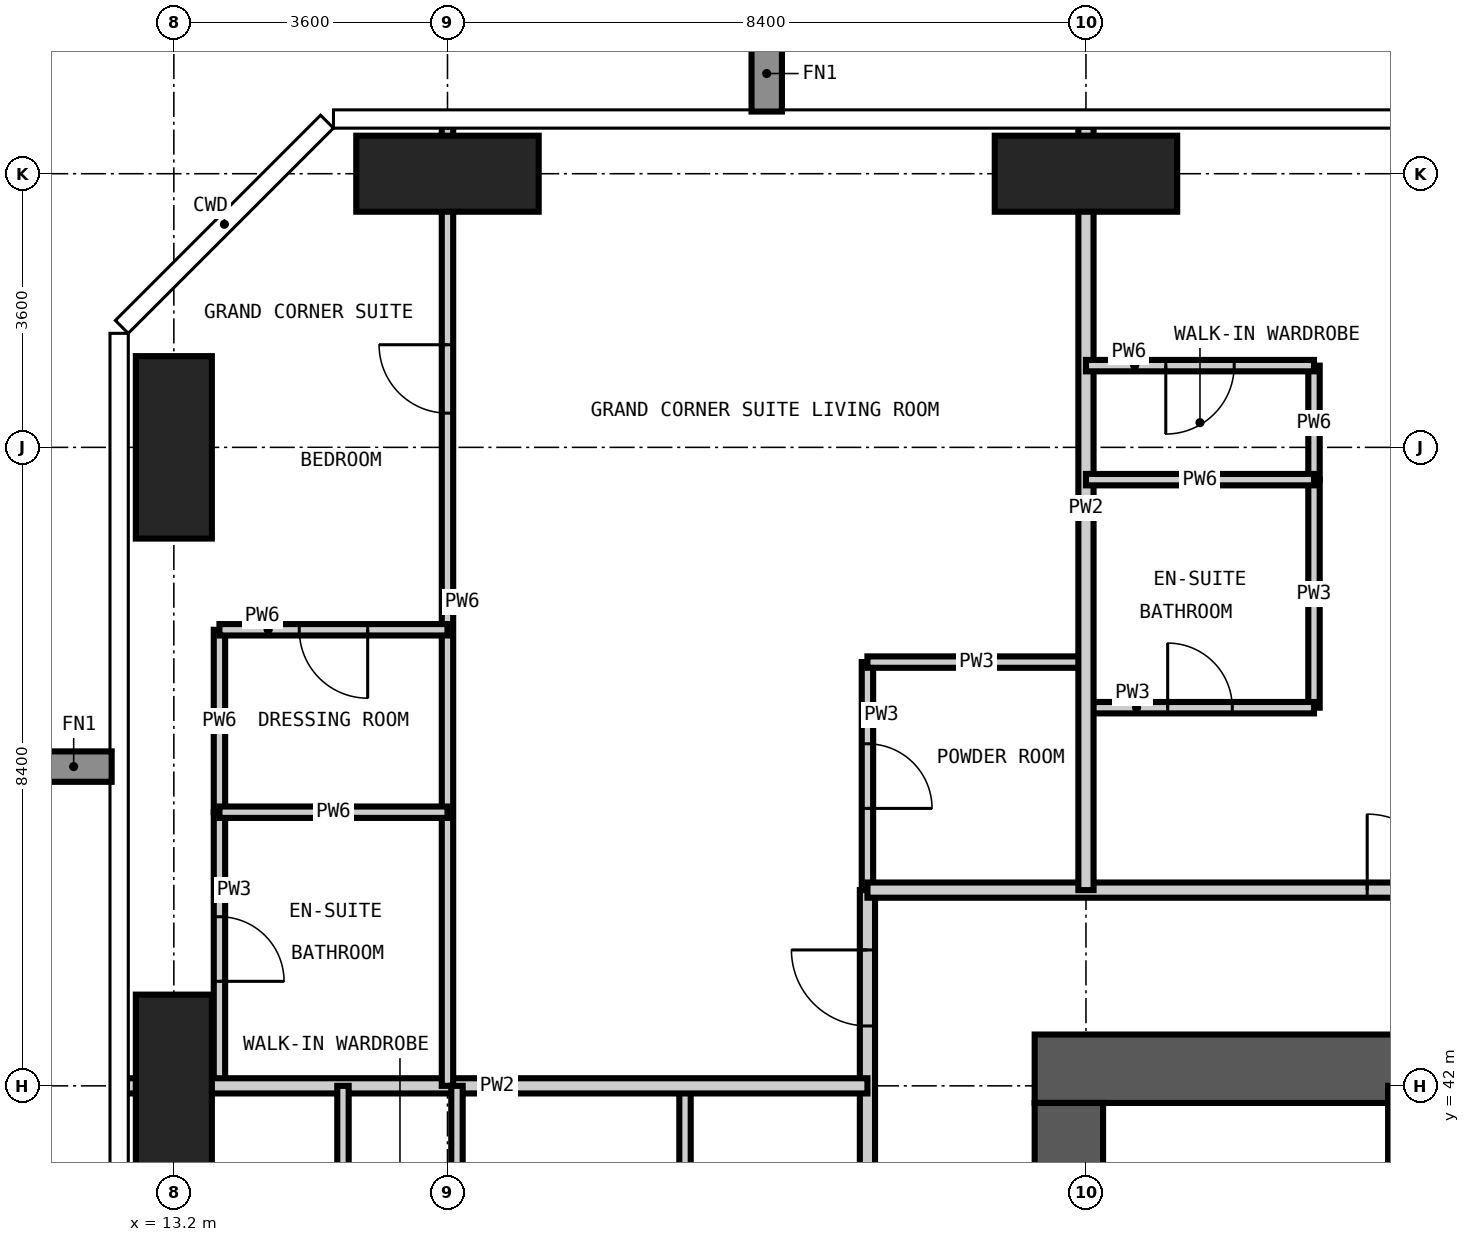
"""IFC4 building model, lengths in metres.
Left out: names, types, materials, properties, quantities, classifications, styles, units other than length and angle.
Written with IfcOpenShell. Run it as: python <this file> out.ifc"""

import sys

from ifc_helpers import new_model, si_unit, direction, frame, frame_2d, origin, origin_2d, place, context, subcontext, project, spatial, rectangle, extrude, element, fill, save


model = new_model("IFC4")
c1 = context("Model", 3, precision=1e-05, world=origin(), true_north=direction((0.0, 1.0)))
c2 = subcontext(c1, "Body", "Model", "MODEL_VIEW")
j1 = project(units=[si_unit("LENGTHUNIT", "METRE"), si_unit("PLANEANGLEUNIT", "RADIAN")], contexts=[c1])
p1 = place(None, origin())
s1 = spatial("IfcSite", under=j1, at=p1, CompositionType="ELEMENT")
p2 = place(p1, origin())
s2 = spatial("IfcBuilding", under=s1, at=p2, CompositionType="ELEMENT")
p3 = place(p2, frame((0.0, 0.0, 237.3)))
s3 = spatial("IfcBuildingStorey", under=s2, at=p3, CompositionType="ELEMENT", Elevation=237.3)
for number, where, z_axis, x_axis in (
    (1, (13.2, 42.0, -0.35), (0.0, 0.0, 1.0), (1.0, 0.0, 0.0)),
    (2, (13.2, 50.4, -0.35), (0.0, 0.0, 1.0), (1.0, 0.0, 0.0)),
):
    element("IfcColumn", number, at=place(p3, frame(where, z_axis=z_axis, x_axis=x_axis)), inside=s3, PredefinedType="COLUMN", context=c2, shape_type="SweptSolid", body=[
        extrude(rectangle(XDim=1.0, YDim=2.4, at=origin_2d()), origin(), (0.0, 0.0, 1.0), 3.9),
    ])
for number, where, z_axis, x_axis in (
    (3, (16.8, 54.0, -0.35), (0.0, 0.0, 1.0), (1.0, 0.0, 0.0)),
    (4, (25.2, 54.0, -0.35), (0.0, 0.0, 1.0), (1.0, 0.0, 0.0)),
):
    element("IfcColumn", number, at=place(p3, frame(where, z_axis=z_axis, x_axis=x_axis)), inside=s3, PredefinedType="COLUMN", context=c2, shape_type="SweptSolid", body=[
        extrude(rectangle(XDim=2.4, YDim=1.0, at=origin_2d()), origin(), (0.0, 0.0, 1.0), 3.9),
    ])
p4 = place(p3, frame((42.675, 42.225, -0.35), z_axis=(0.0, 0.0, 1.0), x_axis=(-1.0, 0.0, 0.0)))
e5 = element("IfcWall", 5, at=p4, inside=s3, PredefinedType="SHEAR", context=c2, shape_type="SweptSolid", body=[
    extrude(rectangle(XDim=18.15, YDim=0.9, at=frame_2d((9.075, 0.0))), origin(), (0.0, 0.0, 1.0), 3.9),
])
p5 = place(p4, frame((10.575, 0.0, 0.35)))
e6 = element("IfcOpeningElement", 6, at=p5, cuts=e5, PredefinedType="OPENING", context=c2, shape_type="SweptSolid", body=[
    extrude(rectangle(XDim=1.2, YDim=2.2, at=frame_2d((0.6, 1.1))), frame((0.0, 0.46, 0.0), z_axis=(0.0, -1.0, 0.0), x_axis=(1.0, 0.0, 0.0)), (0.0, 0.0, 1.0), 0.92),
])
p6 = place(p3, frame((24.975, 41.775, -0.35), z_axis=(0.0, 0.0, 1.0), x_axis=(0.0, -1.0, 0.0)))
e7 = element("IfcWall", 7, at=p6, inside=s3, PredefinedType="SHEAR", context=c2, shape_type="SweptSolid", body=[
    extrude(rectangle(XDim=24.75, YDim=0.9, at=frame_2d((12.375, 0.0))), origin(), (0.0, 0.0, 1.0), 3.9),
])
p7 = place(p6, frame((11.875, 0.0, 0.35)))
e8 = element("IfcOpeningElement", 8, at=p7, cuts=e7, PredefinedType="OPENING", context=c2, shape_type="SweptSolid", body=[
    extrude(rectangle(XDim=1.0, YDim=2.1, at=frame_2d((0.5, 1.05))), frame((0.0, 0.46, 0.0), z_axis=(0.0, -1.0, 0.0), x_axis=(1.0, 0.0, 0.0)), (0.0, 0.0, 1.0), 0.92),
])
p8 = place(p3, frame((29.4, 33.6, -0.35), z_axis=(0.0, 0.0, 1.0), x_axis=(0.0, 1.0, 0.0)))
e9 = element("IfcWall", 9, at=p8, inside=s3, PredefinedType="SHEAR", context=c2, shape_type="SweptSolid", body=[
    extrude(rectangle(XDim=8.4, YDim=0.45, at=frame_2d((4.2, 0.0))), origin(), (0.0, 0.0, 1.0), 3.9),
])
p9 = place(p8, frame((0.525, 0.0, 0.35)))
e10 = element("IfcOpeningElement", 10, at=p9, cuts=e9, PredefinedType="OPENING", context=c2, shape_type="SweptSolid", body=[
    extrude(rectangle(XDim=1.2, YDim=2.2, at=frame_2d((0.6, 1.1))), frame((0.0, 0.235, 0.0), z_axis=(0.0, -1.0, 0.0), x_axis=(1.0, 0.0, 0.0)), (0.0, 0.0, 1.0), 0.47),
])
p10 = place(p3, frame((13.8, 42.0, 0.0), z_axis=(0.0, 0.0, 1.0), x_axis=(0.0, 1.0, 0.0)))
e11 = element("IfcWall", 11, at=p10, inside=s3, PredefinedType="PARTITIONING", context=c2, shape_type="SweptSolid", body=[
    extrude(rectangle(XDim=3.6, YDim=0.15, at=frame_2d((1.8, 0.0))), origin(), (0.0, 0.0, 1.0), 3.55),
])
p11 = place(p10, frame((1.375, 0.0, 0.0)))
e12 = element("IfcOpeningElement", 12, at=p11, cuts=e11, PredefinedType="OPENING", context=c2, shape_type="SweptSolid", body=[
    extrude(rectangle(XDim=0.85, YDim=2.1, at=frame_2d((0.425, 1.05))), frame((0.0, 0.085, 0.0), z_axis=(0.0, -1.0, 0.0), x_axis=(1.0, 0.0, 0.0)), (0.0, 0.0, 1.0), 0.17),
])
p12 = place(p3, frame((19.925, 39.0, 0.0), z_axis=(0.0, 0.0, 1.0), x_axis=(0.0, 1.0, 0.0)))
e13 = element("IfcWall", 13, at=p12, inside=s3, PredefinedType="PARTITIONING", context=c2, shape_type="SweptSolid", body=[
    extrude(rectangle(XDim=3.0, YDim=0.15, at=frame_2d((1.5, 0.0))), origin(), (0.0, 0.0, 1.0), 3.55),
])
p13 = place(p3, frame((22.325, 44.575, 0.0), z_axis=(0.0, 0.0, 1.0), x_axis=(0.0, 1.0, 0.0)))
e14 = element("IfcWall", 14, at=p13, inside=s3, PredefinedType="PARTITIONING", context=c2, shape_type="SweptSolid", body=[
    extrude(rectangle(XDim=3.0, YDim=0.15, at=frame_2d((1.5, 0.0))), origin(), (0.0, 0.0, 1.0), 3.55),
])
p14 = place(p13, frame((1.075, 0.0, 0.0)))
e15 = element("IfcOpeningElement", 15, at=p14, cuts=e14, PredefinedType="OPENING", context=c2, shape_type="SweptSolid", body=[
    extrude(rectangle(XDim=0.85, YDim=2.1, at=frame_2d((0.425, 1.05))), frame((0.0, 0.085, 0.0), z_axis=(0.0, -1.0, 0.0), x_axis=(1.0, 0.0, 0.0)), (0.0, 0.0, 1.0), 0.17),
])
p15 = place(p3, frame((28.2, 46.975, 0.0), z_axis=(0.0, 0.0, 1.0), x_axis=(0.0, 1.0, 0.0)))
e16 = element("IfcWall", 16, at=p15, inside=s3, PredefinedType="PARTITIONING", context=c2, shape_type="SweptSolid", body=[
    extrude(rectangle(XDim=3.0, YDim=0.15, at=frame_2d((1.5, 0.0))), origin(), (0.0, 0.0, 1.0), 3.55),
])
p16 = place(p3, frame((25.2, 46.975, 0.0), z_axis=(0.0, 0.0, 1.0), x_axis=(1.0, 0.0, 0.0)))
e17 = element("IfcWall", 17, at=p16, inside=s3, PredefinedType="PARTITIONING", context=c2, shape_type="SweptSolid", body=[
    extrude(rectangle(XDim=3.0, YDim=0.15, at=frame_2d((1.5, 0.0))), origin(), (0.0, 0.0, 1.0), 3.55),
])
p17 = place(p16, frame((1.075, 0.0, 0.0)))
e18 = element("IfcOpeningElement", 18, at=p17, cuts=e17, PredefinedType="OPENING", context=c2, shape_type="SweptSolid", body=[
    extrude(rectangle(XDim=0.85, YDim=2.1, at=frame_2d((0.425, 1.05))), frame((0.0, 0.085, 0.0), z_axis=(0.0, -1.0, 0.0), x_axis=(1.0, 0.0, 0.0)), (0.0, 0.0, 1.0), 0.17),
])
p18 = place(p3, frame((22.325, 47.575, 0.0), z_axis=(0.0, 0.0, 1.0), x_axis=(1.0, 0.0, 0.0)))
e19 = element("IfcWall", 19, at=p18, inside=s3, PredefinedType="PARTITIONING", context=c2, shape_type="SweptSolid", body=[
    extrude(rectangle(XDim=2.875, YDim=0.15, at=frame_2d((1.438, 0.0))), origin(), (0.0, 0.0, 1.0), 3.55),
])
p19 = place(p3, frame((22.325, 13.925, 0.0), z_axis=(0.0, 0.0, 1.0), x_axis=(0.0, 1.0, 0.0)))
e20 = element("IfcWall", 20, at=p19, inside=s3, PredefinedType="PARTITIONING", context=c2, shape_type="SweptSolid", body=[
    extrude(rectangle(XDim=30.65, YDim=0.2, at=frame_2d((15.325, 0.0))), origin(), (0.0, 0.0, 1.0), 3.55),
])
p20 = place(p19, frame((8.675, 0.0, 0.0)))
e21 = element("IfcOpeningElement", 21, at=p20, cuts=e20, PredefinedType="OPENING", context=c2, shape_type="SweptSolid", body=[
    extrude(rectangle(XDim=1.0, YDim=2.2, at=frame_2d((0.5, 1.1))), frame((0.0, 0.11, 0.0), z_axis=(0.0, -1.0, 0.0), x_axis=(1.0, 0.0, 0.0)), (0.0, 0.0, 1.0), 0.22),
])
p21 = place(p19, frame((21.275, 0.0, 0.0)))
e22 = element("IfcOpeningElement", 22, at=p21, cuts=e20, PredefinedType="OPENING", context=c2, shape_type="SweptSolid", body=[
    extrude(rectangle(XDim=1.0, YDim=2.2, at=frame_2d((0.5, 1.1))), frame((0.0, 0.11, 0.0), z_axis=(0.0, -1.0, 0.0), x_axis=(1.0, 0.0, 0.0)), (0.0, 0.0, 1.0), 0.22),
])
p22 = place(p19, frame((0.938, 0.0, 0.0)))
e23 = element("IfcOpeningElement", 23, at=p22, cuts=e20, PredefinedType="OPENING", context=c2, shape_type="SweptSolid", body=[
    extrude(rectangle(XDim=1.0, YDim=2.2, at=frame_2d((0.5, 1.1))), frame((0.0, 0.11, 0.0), z_axis=(0.0, -1.0, 0.0), x_axis=(1.0, 0.0, 0.0)), (0.0, 0.0, 1.0), 0.22),
])
p23 = place(p19, frame((28.863, 0.0, 0.0)))
e24 = element("IfcOpeningElement", 24, at=p23, cuts=e20, PredefinedType="OPENING", context=c2, shape_type="SweptSolid", body=[
    extrude(rectangle(XDim=1.0, YDim=2.2, at=frame_2d((0.5, 1.1))), frame((0.0, 0.11, 0.0), z_axis=(0.0, -1.0, 0.0), x_axis=(1.0, 0.0, 0.0)), (0.0, 0.0, 1.0), 0.22),
])
p24 = place(p3, frame((22.325, 44.575, 0.0), z_axis=(0.0, 0.0, 1.0), x_axis=(1.0, 0.0, 0.0)))
e25 = element("IfcWall", 25, at=p24, inside=s3, PredefinedType="PARTITIONING", context=c2, shape_type="SweptSolid", body=[
    extrude(rectangle(XDim=22.85, YDim=0.2, at=frame_2d((11.425, 0.0))), origin(), (0.0, 0.0, 1.0), 3.55),
])
p25 = place(p24, frame((6.575, 0.0, 0.0)))
e26 = element("IfcOpeningElement", 26, at=p25, cuts=e25, PredefinedType="OPENING", context=c2, shape_type="SweptSolid", body=[
    extrude(rectangle(XDim=1.0, YDim=2.2, at=frame_2d((0.5, 1.1))), frame((0.0, 0.11, 0.0), z_axis=(0.0, -1.0, 0.0), x_axis=(1.0, 0.0, 0.0)), (0.0, 0.0, 1.0), 0.22),
])
p26 = place(p24, frame((14.975, 0.0, 0.0)))
e27 = element("IfcOpeningElement", 27, at=p26, cuts=e25, PredefinedType="OPENING", context=c2, shape_type="SweptSolid", body=[
    extrude(rectangle(XDim=1.0, YDim=2.2, at=frame_2d((0.5, 1.1))), frame((0.0, 0.11, 0.0), z_axis=(0.0, -1.0, 0.0), x_axis=(1.0, 0.0, 0.0)), (0.0, 0.0, 1.0), 0.22),
])
p27 = place(p3, frame((25.2, 44.575, 0.0), z_axis=(0.0, 0.0, 1.0), x_axis=(0.0, 1.0, 0.0)))
e28 = element("IfcWall", 28, at=p27, inside=s3, PredefinedType="PARTITIONING", context=c2, shape_type="SweptSolid", body=[
    extrude(rectangle(XDim=10.043, YDim=0.2, at=frame_2d((5.021, 0.0))), origin(), (0.0, 0.0, 1.0), 3.55),
])
p28 = place(p3, frame((12.582, 42.0, 0.0), z_axis=(0.0, 0.0, 1.0), x_axis=(1.0, 0.0, 0.0)))
e29 = element("IfcWall", 29, at=p28, inside=s3, PredefinedType="PARTITIONING", context=c2, shape_type="SweptSolid", body=[
    extrude(rectangle(XDim=9.743, YDim=0.2, at=frame_2d((4.872, 0.0))), origin(), (0.0, 0.0, 1.0), 3.55),
])
p29 = place(p3, frame((13.8, 45.6, 0.0), z_axis=(0.0, 0.0, 1.0), x_axis=(0.0, 1.0, 0.0)))
e30 = element("IfcWall", 30, at=p29, inside=s3, PredefinedType="PARTITIONING", context=c2, shape_type="SweptSolid", body=[
    extrude(rectangle(XDim=2.4, YDim=0.15, at=frame_2d((1.2, 0.0))), origin(), (0.0, 0.0, 1.0), 3.55),
])
p30 = place(p3, frame((15.425, 39.0, 0.0), z_axis=(0.0, 0.0, 1.0), x_axis=(0.0, 1.0, 0.0)))
e31 = element("IfcWall", 31, at=p30, inside=s3, PredefinedType="PARTITIONING", context=c2, shape_type="SweptSolid", body=[
    extrude(rectangle(XDim=3.0, YDim=0.15, at=frame_2d((1.5, 0.0))), origin(), (0.0, 0.0, 1.0), 3.55),
])
p31 = place(p30, frame((1.05, 0.0, 0.0)))
e32 = element("IfcOpeningElement", 32, at=p31, cuts=e31, PredefinedType="OPENING", context=c2, shape_type="SweptSolid", body=[
    extrude(rectangle(XDim=0.9, YDim=2.1, at=frame_2d((0.45, 1.05))), frame((0.0, 0.085, 0.0), z_axis=(0.0, -1.0, 0.0), x_axis=(1.0, 0.0, 0.0)), (0.0, 0.0, 1.0), 0.17),
])
p32 = place(p3, frame((16.8, 42.0, 0.0), z_axis=(0.0, 0.0, 1.0), x_axis=(0.0, 1.0, 0.0)))
e33 = element("IfcWall", 33, at=p32, inside=s3, PredefinedType="PARTITIONING", context=c2, shape_type="SweptSolid", body=[
    extrude(rectangle(XDim=12.618, YDim=0.15, at=frame_2d((6.309, 0.0))), origin(), (0.0, 0.0, 1.0), 3.55),
])
p33 = place(p32, frame((8.85, 0.0, 0.0)))
e34 = element("IfcOpeningElement", 34, at=p33, cuts=e33, PredefinedType="OPENING", context=c2, shape_type="SweptSolid", body=[
    extrude(rectangle(XDim=0.9, YDim=2.1, at=frame_2d((0.45, 1.05))), frame((0.0, 0.085, 0.0), z_axis=(0.0, -1.0, 0.0), x_axis=(1.0, 0.0, 0.0)), (0.0, 0.0, 1.0), 0.17),
])
p34 = place(p3, frame((16.925, 39.0, 0.0), z_axis=(0.0, 0.0, 1.0), x_axis=(0.0, 1.0, 0.0)))
e35 = element("IfcWall", 35, at=p34, inside=s3, PredefinedType="PARTITIONING", context=c2, shape_type="SweptSolid", body=[
    extrude(rectangle(XDim=3.0, YDim=0.15, at=frame_2d((1.5, 0.0))), origin(), (0.0, 0.0, 1.0), 3.55),
])
p35 = place(p3, frame((28.2, 49.975, 0.0), z_axis=(0.0, 0.0, 1.0), x_axis=(0.0, 1.0, 0.0)))
e36 = element("IfcWall", 36, at=p35, inside=s3, PredefinedType="PARTITIONING", context=c2, shape_type="SweptSolid", body=[
    extrude(rectangle(XDim=1.5, YDim=0.15, at=frame_2d((0.75, 0.0))), origin(), (0.0, 0.0, 1.0), 3.55),
])
p36 = place(p3, frame((13.8, 45.6, 0.0), z_axis=(0.0, 0.0, 1.0), x_axis=(1.0, 0.0, 0.0)))
e37 = element("IfcWall", 37, at=p36, inside=s3, PredefinedType="PARTITIONING", context=c2, shape_type="SweptSolid", body=[
    extrude(rectangle(XDim=3.0, YDim=0.15, at=frame_2d((1.5, 0.0))), origin(), (0.0, 0.0, 1.0), 3.55),
])
p37 = place(p3, frame((13.8, 48.0, 0.0), z_axis=(0.0, 0.0, 1.0), x_axis=(1.0, 0.0, 0.0)))
e38 = element("IfcWall", 38, at=p37, inside=s3, PredefinedType="PARTITIONING", context=c2, shape_type="SweptSolid", body=[
    extrude(rectangle(XDim=3.0, YDim=0.15, at=frame_2d((1.5, 0.0))), origin(), (0.0, 0.0, 1.0), 3.55),
])
p38 = place(p37, frame((1.05, 0.0, 0.0)))
e39 = element("IfcOpeningElement", 39, at=p38, cuts=e38, PredefinedType="OPENING", context=c2, shape_type="SweptSolid", body=[
    extrude(rectangle(XDim=0.9, YDim=2.1, at=frame_2d((0.45, 1.05))), frame((0.0, 0.085, 0.0), z_axis=(0.0, -1.0, 0.0), x_axis=(1.0, 0.0, 0.0)), (0.0, 0.0, 1.0), 0.17),
])
p39 = place(p3, frame((25.2, 49.975, 0.0), z_axis=(0.0, 0.0, 1.0), x_axis=(1.0, 0.0, 0.0)))
e40 = element("IfcWall", 40, at=p39, inside=s3, PredefinedType="PARTITIONING", context=c2, shape_type="SweptSolid", body=[
    extrude(rectangle(XDim=3.0, YDim=0.15, at=frame_2d((1.5, 0.0))), origin(), (0.0, 0.0, 1.0), 3.55),
])
p40 = place(p3, frame((25.2, 51.475, 0.0), z_axis=(0.0, 0.0, 1.0), x_axis=(1.0, 0.0, 0.0)))
e41 = element("IfcWall", 41, at=p40, inside=s3, PredefinedType="PARTITIONING", context=c2, shape_type="SweptSolid", body=[
    extrude(rectangle(XDim=3.0, YDim=0.15, at=frame_2d((1.5, 0.0))), origin(), (0.0, 0.0, 1.0), 3.55),
])
p41 = place(p40, frame((1.05, 0.0, 0.0)))
e42 = element("IfcOpeningElement", 42, at=p41, cuts=e41, PredefinedType="OPENING", context=c2, shape_type="SweptSolid", body=[
    extrude(rectangle(XDim=0.9, YDim=2.1, at=frame_2d((0.45, 1.05))), frame((0.0, 0.085, 0.0), z_axis=(0.0, -1.0, 0.0), x_axis=(1.0, 0.0, 0.0)), (0.0, 0.0, 1.0), 0.17),
])
p42 = place(p25, origin())
e43 = element("IfcDoor", 43, at=p42, inside=s3, OperationType="SINGLE_SWING_LEFT", PredefinedType="DOOR", context=c2, shape_type="SweptSolid", body=[
    extrude(rectangle(XDim=1.0, YDim=2.2, at=frame_2d((0.5, 1.1))), frame((0.0, 0.025, 0.0), z_axis=(0.0, -1.0, 0.0), x_axis=(1.0, 0.0, 0.0)), (0.0, 0.0, 1.0), 0.05),
])
fill(e26, e43)
p43 = place(p17, origin())
e44 = element("IfcDoor", 44, at=p43, inside=s3, OperationType="SINGLE_SWING_LEFT", PredefinedType="DOOR", context=c2, shape_type="SweptSolid", body=[
    extrude(rectangle(XDim=0.85, YDim=2.1, at=frame_2d((0.425, 1.05))), frame((0.0, 0.025, 0.0), z_axis=(0.0, -1.0, 0.0), x_axis=(1.0, 0.0, 0.0)), (0.0, 0.0, 1.0), 0.05),
])
fill(e18, e44)
p44 = place(p41, frame((0.9, 0.0, 0.0), z_axis=(0.0, 0.0, 1.0), x_axis=(-1.0, 0.0, 0.0)))
e45 = element("IfcDoor", 45, at=p44, inside=s3, OperationType="SINGLE_SWING_RIGHT", PredefinedType="DOOR", context=c2, shape_type="SweptSolid", body=[
    extrude(rectangle(XDim=0.9, YDim=2.1, at=frame_2d((0.45, 1.05))), frame((0.0, 0.025, 0.0), z_axis=(0.0, -1.0, 0.0), x_axis=(1.0, 0.0, 0.0)), (0.0, 0.0, 1.0), 0.05),
])
fill(e42, e45)
p45 = place(p23, origin())
e46 = element("IfcDoor", 46, at=p45, inside=s3, OperationType="SINGLE_SWING_RIGHT", PredefinedType="DOOR", context=c2, shape_type="SweptSolid", body=[
    extrude(rectangle(XDim=1.0, YDim=2.2, at=frame_2d((0.5, 1.1))), frame((0.0, 0.025, 0.0), z_axis=(0.0, -1.0, 0.0), x_axis=(1.0, 0.0, 0.0)), (0.0, 0.0, 1.0), 0.05),
])
fill(e24, e46)
p46 = place(p14, frame((0.85, 0.0, 0.0), z_axis=(0.0, 0.0, 1.0), x_axis=(-1.0, 0.0, 0.0)))
e47 = element("IfcDoor", 47, at=p46, inside=s3, OperationType="SINGLE_SWING_RIGHT", PredefinedType="DOOR", context=c2, shape_type="SweptSolid", body=[
    extrude(rectangle(XDim=0.85, YDim=2.1, at=frame_2d((0.425, 1.05))), frame((0.0, 0.025, 0.0), z_axis=(0.0, -1.0, 0.0), x_axis=(1.0, 0.0, 0.0)), (0.0, 0.0, 1.0), 0.05),
])
fill(e15, e47)
p47 = place(p33, origin())
e48 = element("IfcDoor", 48, at=p47, inside=s3, OperationType="SINGLE_SWING_RIGHT", PredefinedType="DOOR", context=c2, shape_type="SweptSolid", body=[
    extrude(rectangle(XDim=0.9, YDim=2.1, at=frame_2d((0.45, 1.05))), frame((0.0, 0.025, 0.0), z_axis=(0.0, -1.0, 0.0), x_axis=(1.0, 0.0, 0.0)), (0.0, 0.0, 1.0), 0.05),
])
fill(e34, e48)
p48 = place(p11, frame((0.85, 0.0, 0.0), z_axis=(0.0, 0.0, 1.0), x_axis=(-1.0, 0.0, 0.0)))
e49 = element("IfcDoor", 49, at=p48, inside=s3, OperationType="SINGLE_SWING_RIGHT", PredefinedType="DOOR", context=c2, shape_type="SweptSolid", body=[
    extrude(rectangle(XDim=0.85, YDim=2.1, at=frame_2d((0.425, 1.05))), frame((0.0, 0.025, 0.0), z_axis=(0.0, -1.0, 0.0), x_axis=(1.0, 0.0, 0.0)), (0.0, 0.0, 1.0), 0.05),
])
fill(e12, e49)
p49 = place(p38, frame((0.9, 0.0, 0.0), z_axis=(0.0, 0.0, 1.0), x_axis=(-1.0, 0.0, 0.0)))
e50 = element("IfcDoor", 50, at=p49, inside=s3, OperationType="SINGLE_SWING_LEFT", PredefinedType="DOOR", context=c2, shape_type="SweptSolid", body=[
    extrude(rectangle(XDim=0.9, YDim=2.1, at=frame_2d((0.45, 1.05))), frame((0.0, 0.025, 0.0), z_axis=(0.0, -1.0, 0.0), x_axis=(1.0, 0.0, 0.0)), (0.0, 0.0, 1.0), 0.05),
])
fill(e39, e50)
save(model, sys.argv[1])
